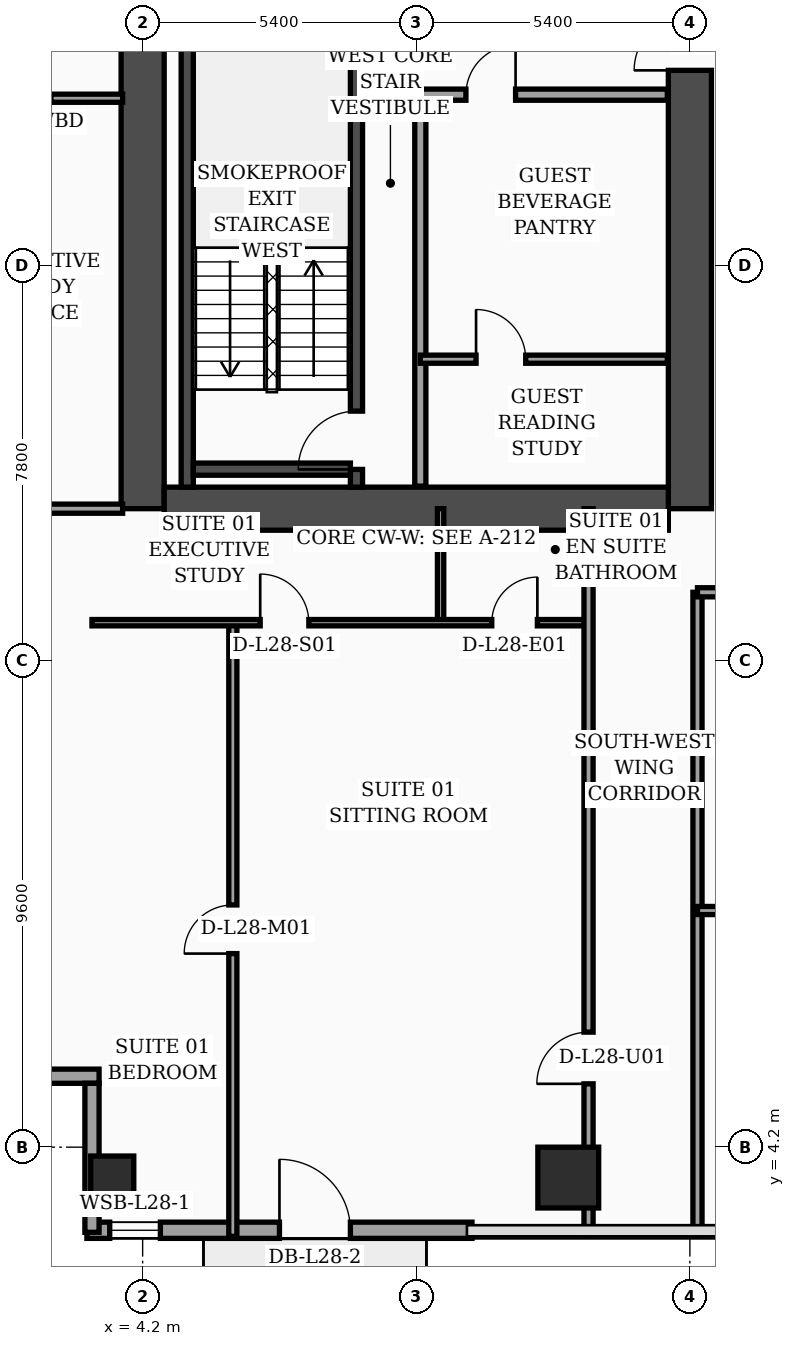
"""IFC4 building model, lengths in metres.
Left out: names, types, materials, properties, quantities, classifications, styles, units other than length and angle.
Written with IfcOpenShell. Run it as: python <this file> out.ifc"""

import sys

from ifc_helpers import new_model, si_unit, direction, frame, frame_2d, origin, origin_2d, place, context, subcontext, project, spatial, rectangle, hollow_rectangle, extrude, element, fill, save


model = new_model("IFC4")
c1 = context("Model", 3, precision=1e-05, world=origin(), true_north=direction((0.0, 1.0)))
c2 = subcontext(c1, "Body", "Model", "MODEL_VIEW")
j1 = project(units=[si_unit("LENGTHUNIT", "METRE"), si_unit("PLANEANGLEUNIT", "RADIAN")], contexts=[c1])
p1 = place(None, origin())
s1 = spatial("IfcSite", under=j1, at=p1, CompositionType="ELEMENT")
p2 = place(p1, origin())
s2 = spatial("IfcBuilding", under=s1, at=p2, CompositionType="ELEMENT")
p3 = place(p2, frame((0.0, 0.0, 116.4)))
s3 = spatial("IfcBuildingStorey", under=s2, at=p3, CompositionType="ELEMENT", Elevation=116.4)
p4 = place(p3, frame((4.2, 16.8, 0.0), z_axis=(0.0, 0.0, 1.0), x_axis=(0.0, 1.0, 0.0)))
e1 = element("IfcWall", 1, at=p4, inside=s3, PredefinedType="SHEAR", context=c2, shape_type="SweptSolid", body=[
    extrude(rectangle(XDim=21.6, YDim=0.85, at=frame_2d((10.8, 0.0))), origin(), (0.0, 0.0, 1.0), 3.56),
])
p5 = place(p3, frame((15.0, 16.8, 0.0), z_axis=(0.0, 0.0, 1.0), x_axis=(0.0, 1.0, 0.0)))
e2 = element("IfcWall", 2, at=p5, inside=s3, PredefinedType="SHEAR", context=c2, shape_type="SweptSolid", body=[
    extrude(rectangle(XDim=21.6, YDim=0.85, at=frame_2d((10.8, 0.0))), origin(), (0.0, 0.0, 1.0), 3.56),
])
p6 = place(p5, frame((8.65, 0.0, 0.0)))
e3 = element("IfcOpeningElement", 3, at=p6, cuts=e2, PredefinedType="OPENING", context=c2, shape_type="SweptSolid", body=[
    extrude(rectangle(XDim=1.1, YDim=2.2, at=frame_2d((0.55, 1.1))), frame((0.0, 0.435, 0.0), z_axis=(0.0, -1.0, 0.0), x_axis=(1.0, 0.0, 0.0)), (0.0, 0.0, 1.0), 0.87),
])
p7 = place(p5, frame((10.85, 0.0, 0.0)))
e4 = element("IfcOpeningElement", 4, at=p7, cuts=e2, PredefinedType="OPENING", context=c2, shape_type="SweptSolid", body=[
    extrude(rectangle(XDim=1.1, YDim=2.2, at=frame_2d((0.55, 1.1))), frame((0.0, 0.435, 0.0), z_axis=(0.0, -1.0, 0.0), x_axis=(1.0, 0.0, 0.0)), (0.0, 0.0, 1.0), 0.87),
])
p8 = place(p5, frame((13.5, 0.0, 0.0)))
e5 = element("IfcOpeningElement", 5, at=p8, cuts=e2, PredefinedType="OPENING", context=c2, shape_type="SweptSolid", body=[
    extrude(rectangle(XDim=1.1, YDim=2.2, at=frame_2d((0.55, 1.1))), frame((0.0, 0.435, 0.0), z_axis=(0.0, -1.0, 0.0), x_axis=(1.0, 0.0, 0.0)), (0.0, 0.0, 1.0), 0.87),
])
p9 = place(p5, frame((16.15, 0.0, 0.0)))
e6 = element("IfcOpeningElement", 6, at=p9, cuts=e2, PredefinedType="OPENING", context=c2, shape_type="SweptSolid", body=[
    extrude(rectangle(XDim=1.1, YDim=2.2, at=frame_2d((0.55, 1.1))), frame((0.0, 0.435, 0.0), z_axis=(0.0, -1.0, 0.0), x_axis=(1.0, 0.0, 0.0)), (0.0, 0.0, 1.0), 0.87),
])
p10 = place(p3, frame((4.625, 16.8, 0.0), z_axis=(0.0, 0.0, 1.0), x_axis=(1.0, 0.0, 0.0)))
e7 = element("IfcWall", 7, at=p10, inside=s3, PredefinedType="SHEAR", context=c2, shape_type="SweptSolid", body=[
    extrude(rectangle(XDim=9.95, YDim=0.85, at=frame_2d((4.975, 0.0))), origin(), (0.0, 0.0, 1.0), 3.56),
])
p11 = place(p3, frame((5.08, 17.225, 0.0), z_axis=(0.0, 0.0, 1.0), x_axis=(0.0, 1.0, 0.0)))
e8 = element("IfcWall", 8, at=p11, inside=s3, PredefinedType="SOLIDWALL", context=c2, shape_type="SweptSolid", body=[
    extrude(rectangle(XDim=9.565, YDim=0.24, at=frame_2d((4.782, 0.0))), origin(), (0.0, 0.0, 1.0), 3.56),
])
p12 = place(p3, frame((8.42, 17.225, 0.0), z_axis=(0.0, 0.0, 1.0), x_axis=(0.0, 1.0, 0.0)))
e9 = element("IfcWall", 9, at=p12, inside=s3, PredefinedType="SOLIDWALL", context=c2, shape_type="SweptSolid", body=[
    extrude(rectangle(XDim=9.565, YDim=0.24, at=frame_2d((4.782, 0.0))), origin(), (0.0, 0.0, 1.0), 3.56),
])
p13 = place(p12, frame((0.35, 0.0, 0.0)))
e10 = element("IfcOpeningElement", 10, at=p13, cuts=e9, PredefinedType="OPENING", context=c2, shape_type="SweptSolid", body=[
    extrude(rectangle(XDim=1.15, YDim=2.2, at=frame_2d((0.575, 1.1))), frame((0.0, 0.13, 0.0), z_axis=(0.0, -1.0, 0.0), x_axis=(1.0, 0.0, 0.0)), (0.0, 0.0, 1.0), 0.26),
])
p14 = place(p3, frame((5.2, 17.58, 0.0), z_axis=(0.0, 0.0, 1.0), x_axis=(1.0, 0.0, 0.0)))
e11 = element("IfcWall", 11, at=p14, inside=s3, PredefinedType="SOLIDWALL", context=c2, shape_type="SweptSolid", body=[
    extrude(rectangle(XDim=3.1, YDim=0.24, at=frame_2d((1.55, 0.0))), origin(), (0.0, 0.0, 1.0), 3.56),
])
p15 = place(p3, frame((3.6, 3.6, 0.0), z_axis=(0.0, 0.0, 1.0), x_axis=(1.0, 0.0, 0.0)))
e12 = element("IfcColumn", 12, at=p15, inside=s3, PredefinedType="COLUMN", context=c2, shape_type="SweptSolid", body=[
    extrude(hollow_rectangle(XDim=0.85, YDim=0.85, WallThickness=0.036, at=origin_2d()), origin(), (0.0, 0.0, 1.0), 3.56),
])
p16 = place(p3, frame((12.6, 3.6, 0.0), z_axis=(0.0, 0.0, 1.0), x_axis=(1.0, 0.0, 0.0)))
e13 = element("IfcColumn", 13, at=p16, inside=s3, PredefinedType="COLUMN", context=c2, shape_type="SweptSolid", body=[
    extrude(rectangle(XDim=1.2, YDim=1.2, at=origin_2d()), origin(), (0.0, 0.0, 1.0), 3.56),
])
p17 = place(p3, frame((3.1, 2.56, 0.0), z_axis=(0.0, 0.0, 1.0), x_axis=(1.0, 0.0, 0.0)))
e14 = element("IfcWall", 14, at=p17, inside=s3, PredefinedType="SOLIDWALL", context=c2, shape_type="SweptSolid", body=[
    extrude(rectangle(XDim=7.6, YDim=0.32, at=frame_2d((3.8, 0.0))), origin(), (0.0, 0.0, 1.0), 3.56),
])
p18 = place(p17, frame((0.45, 0.0, 0.75)))
e15 = element("IfcOpeningElement", 15, at=p18, cuts=e14, PredefinedType="OPENING", context=c2, shape_type="SweptSolid", body=[
    extrude(rectangle(XDim=1.0, YDim=1.6, at=frame_2d((0.5, 0.8))), frame((0.0, 0.17, 0.0), z_axis=(0.0, -1.0, 0.0), x_axis=(1.0, 0.0, 0.0)), (0.0, 0.0, 1.0), 0.34),
])
p19 = place(p17, frame((3.8, 0.0, 0.0)))
e16 = element("IfcOpeningElement", 16, at=p19, cuts=e14, PredefinedType="OPENING", context=c2, shape_type="SweptSolid", body=[
    extrude(rectangle(XDim=1.4, YDim=2.25, at=frame_2d((0.7, 1.125))), frame((0.0, 0.17, 0.0), z_axis=(0.0, -1.0, 0.0), x_axis=(1.0, 0.0, 0.0)), (0.0, 0.0, 1.0), 0.34),
])
p20 = place(p3, frame((0.12, 5.6, 0.0), z_axis=(0.0, 0.0, 1.0), x_axis=(1.0, 0.0, 0.0)))
e17 = element("IfcWall", 17, at=p20, inside=s3, PredefinedType="SOLIDWALL", context=c2, shape_type="SweptSolid", body=[
    extrude(rectangle(XDim=3.22, YDim=0.28, at=frame_2d((1.61, 0.0))), origin(), (0.0, 0.0, 1.0), 2.84),
])
p21 = place(p3, frame((3.2, 5.46, 0.0), z_axis=(0.0, 0.0, 1.0), x_axis=(0.0, -1.0, 0.0)))
e18 = element("IfcWall", 18, at=p21, inside=s3, PredefinedType="SOLIDWALL", context=c2, shape_type="SweptSolid", body=[
    extrude(rectangle(XDim=2.94, YDim=0.28, at=frame_2d((1.47, 0.0))), origin(), (0.0, 0.0, 1.0), 2.84),
])
p22 = place(p3, frame((9.68, 17.245, 0.0), z_axis=(0.0, 0.0, 1.0), x_axis=(0.0, 1.0, 0.0)))
e19 = element("IfcWall", 19, at=p22, inside=s3, PredefinedType="SOLIDWALL", context=c2, shape_type="SweptSolid", body=[
    extrude(rectangle(XDim=7.755, YDim=0.22, at=frame_2d((3.877, 0.0))), origin(), (0.0, 0.0, 1.0), 3.56),
])
p23 = place(p3, frame((9.68, 19.75, 0.0), z_axis=(0.0, 0.0, 1.0), x_axis=(1.0, 0.0, 0.0)))
e20 = element("IfcWall", 20, at=p23, inside=s3, PredefinedType="PARTITIONING", context=c2, shape_type="SweptSolid", body=[
    extrude(rectangle(XDim=4.875, YDim=0.16, at=frame_2d((2.438, 0.0))), origin(), (0.0, 0.0, 1.0), 3.56),
])
p24 = place(p23, frame((1.1, 0.0, 0.0)))
e21 = element("IfcOpeningElement", 21, at=p24, cuts=e20, PredefinedType="OPENING", context=c2, shape_type="SweptSolid", body=[
    extrude(rectangle(XDim=0.98, YDim=2.15, at=frame_2d((0.49, 1.075))), frame((0.0, 0.09, 0.0), z_axis=(0.0, -1.0, 0.0), x_axis=(1.0, 0.0, 0.0)), (0.0, 0.0, 1.0), 0.18),
])
p25 = place(p3, frame((9.68, 24.97, 0.0), z_axis=(0.0, 0.0, 1.0), x_axis=(1.0, 0.0, 0.0)))
e22 = element("IfcWall", 22, at=p25, inside=s3, PredefinedType="SOLIDWALL", context=c2, shape_type="SweptSolid", body=[
    extrude(rectangle(XDim=4.875, YDim=0.22, at=frame_2d((2.438, 0.0))), origin(), (0.0, 0.0, 1.0), 2.84),
])
p26 = place(p25, frame((0.9, 0.0, 0.0)))
e23 = element("IfcOpeningElement", 23, at=p26, cuts=e22, PredefinedType="OPENING", context=c2, shape_type="SweptSolid", body=[
    extrude(rectangle(XDim=0.98, YDim=2.15, at=frame_2d((0.49, 1.075))), frame((0.0, 0.12, 0.0), z_axis=(0.0, -1.0, 0.0), x_axis=(1.0, 0.0, 0.0)), (0.0, 0.0, 1.0), 0.24),
])
p27 = place(p3, frame((0.08, 24.9, 0.0), z_axis=(0.0, 0.0, 1.0), x_axis=(1.0, 0.0, 0.0)))
e24 = element("IfcWall", 24, at=p27, inside=s3, PredefinedType="PARTITIONING", context=c2, shape_type="SweptSolid", body=[
    extrude(rectangle(XDim=3.725, YDim=0.16, at=frame_2d((1.862, 0.0))), origin(), (0.0, 0.0, 1.0), 3.04),
])
p28 = place(p27, frame((1.35, 0.0, 0.0)))
e25 = element("IfcOpeningElement", 25, at=p28, cuts=e24, PredefinedType="OPENING", context=c2, shape_type="SweptSolid", body=[
    extrude(rectangle(XDim=0.96, YDim=2.2, at=frame_2d((0.48, 1.1))), frame((0.0, 0.09, 0.0), z_axis=(0.0, -1.0, 0.0), x_axis=(1.0, 0.0, 0.0)), (0.0, 0.0, 1.0), 0.18),
])
p29 = place(p3, frame((0.08, 16.8, 0.0), z_axis=(0.0, 0.0, 1.0), x_axis=(1.0, 0.0, 0.0)))
e26 = element("IfcWall", 26, at=p29, inside=s3, PredefinedType="PARTITIONING", context=c2, shape_type="SweptSolid", body=[
    extrude(rectangle(XDim=3.725, YDim=0.18, at=frame_2d((1.862, 0.0))), origin(), (0.0, 0.0, 1.0), 2.84),
])
p30 = place(p3, frame((10.08, 14.55, 0.0), z_axis=(0.0, 0.0, 1.0), x_axis=(0.0, 1.0, 0.0)))
e27 = element("IfcWall", 27, at=p30, inside=s3, PredefinedType="PARTITIONING", context=c2, shape_type="SweptSolid", body=[
    extrude(rectangle(XDim=2.25, YDim=0.125, at=frame_2d((1.125, 0.0))), origin(), (0.0, 0.0, 1.0), 3.56),
])
p31 = place(p3, frame((5.98, 2.44, 0.0), z_axis=(0.0, 0.0, 1.0), x_axis=(0.0, 1.0, 0.0)))
e28 = element("IfcWall", 28, at=p31, inside=s3, PredefinedType="PARTITIONING", context=c2, shape_type="SweptSolid", body=[
    extrude(rectangle(XDim=12.11, YDim=0.16, at=frame_2d((6.055, 0.0))), origin(), (0.0, 0.0, 1.0), 3.04),
])
p32 = place(p31, frame((5.58, 0.0, 0.0)))
e29 = element("IfcOpeningElement", 29, at=p32, cuts=e28, PredefinedType="OPENING", context=c2, shape_type="SweptSolid", body=[
    extrude(rectangle(XDim=0.96, YDim=2.2, at=frame_2d((0.48, 1.1))), frame((0.0, 0.09, 0.0), z_axis=(0.0, -1.0, 0.0), x_axis=(1.0, 0.0, 0.0)), (0.0, 0.0, 1.0), 0.18),
])
p33 = place(p3, frame((3.2, 14.55, 0.0), z_axis=(0.0, 0.0, 1.0), x_axis=(1.0, 0.0, 0.0)))
e30 = element("IfcWall", 30, at=p33, inside=s3, PredefinedType="PARTITIONING", context=c2, shape_type="SweptSolid", body=[
    extrude(rectangle(XDim=9.8, YDim=0.125, at=frame_2d((4.9, 0.0))), origin(), (0.0, 0.0, 1.0), 2.84),
])
p34 = place(p33, frame((3.32, 0.0, 0.0)))
e31 = element("IfcOpeningElement", 31, at=p34, cuts=e30, PredefinedType="OPENING", context=c2, shape_type="SweptSolid", body=[
    extrude(rectangle(XDim=0.96, YDim=2.2, at=frame_2d((0.48, 1.1))), frame((0.0, 0.073, 0.0), z_axis=(0.0, -1.0, 0.0), x_axis=(1.0, 0.0, 0.0)), (0.0, 0.0, 1.0), 0.145),
])
p35 = place(p33, frame((7.89, 0.0, 0.0)))
e32 = element("IfcOpeningElement", 32, at=p35, cuts=e30, PredefinedType="OPENING", context=c2, shape_type="SweptSolid", body=[
    extrude(rectangle(XDim=0.9, YDim=2.15, at=frame_2d((0.45, 1.075))), frame((0.0, 0.073, 0.0), z_axis=(0.0, -1.0, 0.0), x_axis=(1.0, 0.0, 0.0)), (0.0, 0.0, 1.0), 0.145),
])
p36 = place(p3, frame((13.0, 2.44, 0.0), z_axis=(0.0, 0.0, 1.0), x_axis=(0.0, 1.0, 0.0)))
e33 = element("IfcWall", 33, at=p36, inside=s3, PredefinedType="PARTITIONING", context=c2, shape_type="SweptSolid", body=[
    extrude(rectangle(XDim=14.36, YDim=0.18, at=frame_2d((7.18, 0.0))), origin(), (0.0, 0.0, 1.0), 2.84),
])
p37 = place(p36, frame((3.01, 0.0, 0.0)))
e34 = element("IfcOpeningElement", 34, at=p37, cuts=e33, PredefinedType="OPENING", context=c2, shape_type="SweptSolid", body=[
    extrude(rectangle(XDim=1.02, YDim=2.2, at=frame_2d((0.51, 1.1))), frame((0.0, 0.1, 0.0), z_axis=(0.0, -1.0, 0.0), x_axis=(1.0, 0.0, 0.0)), (0.0, 0.0, 1.0), 0.2),
])
p38 = place(p3, frame((15.15, 2.44, 0.0), z_axis=(0.0, 0.0, 1.0), x_axis=(0.0, 1.0, 0.0)))
e35 = element("IfcWall", 35, at=p38, inside=s3, PredefinedType="PARTITIONING", context=c2, shape_type="SweptSolid", body=[
    extrude(rectangle(XDim=12.71, YDim=0.18, at=frame_2d((6.355, 0.0))), origin(), (0.0, 0.0, 1.0), 3.04),
])
p39 = place(p3, frame((15.15, 8.87, 0.0), z_axis=(0.0, 0.0, 1.0), x_axis=(1.0, 0.0, 0.0)))
e36 = element("IfcWall", 36, at=p39, inside=s3, PredefinedType="PARTITIONING", context=c2, shape_type="SweptSolid", body=[
    extrude(rectangle(XDim=4.45, YDim=0.16, at=frame_2d((2.225, 0.0))), origin(), (0.0, 0.0, 1.0), 3.56),
])
p40 = place(p39, frame((1.75, 0.0, 0.0)))
e37 = element("IfcOpeningElement", 37, at=p40, cuts=e36, PredefinedType="OPENING", context=c2, shape_type="SweptSolid", body=[
    extrude(rectangle(XDim=0.96, YDim=2.2, at=frame_2d((0.48, 1.1))), frame((0.0, 0.09, 0.0), z_axis=(0.0, -1.0, 0.0), x_axis=(1.0, 0.0, 0.0)), (0.0, 0.0, 1.0), 0.18),
])
p41 = place(p3, frame((15.15, 15.15, 0.0), z_axis=(0.0, 0.0, 1.0), x_axis=(1.0, 0.0, 0.0)))
e38 = element("IfcWall", 38, at=p41, inside=s3, PredefinedType="PARTITIONING", context=c2, shape_type="SweptSolid", body=[
    extrude(rectangle(XDim=6.45, YDim=0.18, at=frame_2d((3.225, 0.0))), origin(), (0.0, 0.0, 1.0), 2.49),
])
p42 = place(p41, frame((1.74, 0.0, 0.0)))
e39 = element("IfcOpeningElement", 39, at=p42, cuts=e38, PredefinedType="OPENING", context=c2, shape_type="SweptSolid", body=[
    extrude(rectangle(XDim=1.02, YDim=2.2, at=frame_2d((0.51, 1.1))), frame((0.0, 0.1, 0.0), z_axis=(0.0, -1.0, 0.0), x_axis=(1.0, 0.0, 0.0)), (0.0, 0.0, 1.0), 0.2),
])
p43 = place(p18, origin())
e40 = element("IfcWindow", 40, at=p43, inside=s3, PartitioningType="SINGLE_PANEL", PredefinedType="WINDOW", context=c2, shape_type="SweptSolid", body=[
    extrude(rectangle(XDim=1.0, YDim=1.6, at=frame_2d((0.5, 0.8))), frame((0.0, 0.03, 0.0), z_axis=(0.0, -1.0, 0.0), x_axis=(1.0, 0.0, 0.0)), (0.0, 0.0, 1.0), 0.06),
])
fill(e15, e40)
p44 = place(p19, origin())
e41 = element("IfcDoor", 41, at=p44, inside=s3, OperationType="SINGLE_SWING_LEFT", PredefinedType="DOOR", context=c2, shape_type="SweptSolid", body=[
    extrude(rectangle(XDim=1.4, YDim=2.25, at=frame_2d((0.7, 1.125))), frame((0.0, 0.025, 0.0), z_axis=(0.0, -1.0, 0.0), x_axis=(1.0, 0.0, 0.0)), (0.0, 0.0, 1.0), 0.05),
])
fill(e16, e41)
p45 = place(p24, origin())
e42 = element("IfcDoor", 42, at=p45, inside=s3, OperationType="SINGLE_SWING_LEFT", PredefinedType="DOOR", context=c2, shape_type="SweptSolid", body=[
    extrude(rectangle(XDim=0.98, YDim=2.15, at=frame_2d((0.49, 1.075))), frame((0.0, 0.025, 0.0), z_axis=(0.0, -1.0, 0.0), x_axis=(1.0, 0.0, 0.0)), (0.0, 0.0, 1.0), 0.05),
])
fill(e21, e42)
p46 = place(p26, origin())
e43 = element("IfcDoor", 43, at=p46, inside=s3, OperationType="SINGLE_SWING_RIGHT", PredefinedType="DOOR", context=c2, shape_type="SweptSolid", body=[
    extrude(rectangle(XDim=0.98, YDim=2.15, at=frame_2d((0.49, 1.075))), frame((0.0, 0.025, 0.0), z_axis=(0.0, -1.0, 0.0), x_axis=(1.0, 0.0, 0.0)), (0.0, 0.0, 1.0), 0.05),
])
fill(e23, e43)
p47 = place(p32, origin())
e44 = element("IfcDoor", 44, at=p47, inside=s3, OperationType="SINGLE_SWING_LEFT", PredefinedType="DOOR", context=c2, shape_type="SweptSolid", body=[
    extrude(rectangle(XDim=0.96, YDim=2.2, at=frame_2d((0.48, 1.1))), frame((0.0, 0.025, 0.0), z_axis=(0.0, -1.0, 0.0), x_axis=(1.0, 0.0, 0.0)), (0.0, 0.0, 1.0), 0.05),
])
fill(e29, e44)
p48 = place(p34, origin())
e45 = element("IfcDoor", 45, at=p48, inside=s3, OperationType="SINGLE_SWING_LEFT", PredefinedType="DOOR", context=c2, shape_type="SweptSolid", body=[
    extrude(rectangle(XDim=0.96, YDim=2.2, at=frame_2d((0.48, 1.1))), frame((0.0, 0.025, 0.0), z_axis=(0.0, -1.0, 0.0), x_axis=(1.0, 0.0, 0.0)), (0.0, 0.0, 1.0), 0.05),
])
fill(e31, e45)
p49 = place(p35, origin())
e46 = element("IfcDoor", 46, at=p49, inside=s3, OperationType="SINGLE_SWING_RIGHT", PredefinedType="DOOR", context=c2, shape_type="SweptSolid", body=[
    extrude(rectangle(XDim=0.9, YDim=2.15, at=frame_2d((0.45, 1.075))), frame((0.0, 0.025, 0.0), z_axis=(0.0, -1.0, 0.0), x_axis=(1.0, 0.0, 0.0)), (0.0, 0.0, 1.0), 0.05),
])
fill(e32, e46)
p50 = place(p37, origin())
e47 = element("IfcDoor", 47, at=p50, inside=s3, OperationType="SINGLE_SWING_LEFT", PredefinedType="DOOR", context=c2, shape_type="SweptSolid", body=[
    extrude(rectangle(XDim=1.02, YDim=2.2, at=frame_2d((0.51, 1.1))), frame((0.0, 0.025, 0.0), z_axis=(0.0, -1.0, 0.0), x_axis=(1.0, 0.0, 0.0)), (0.0, 0.0, 1.0), 0.05),
])
fill(e34, e47)
p51 = place(p13, origin())
e48 = element("IfcDoor", 48, at=p51, inside=s3, OperationType="SINGLE_SWING_LEFT", PredefinedType="DOOR", context=c2, shape_type="SweptSolid", body=[
    extrude(rectangle(XDim=1.15, YDim=2.2, at=frame_2d((0.575, 1.1))), frame((0.0, 0.025, 0.0), z_axis=(0.0, -1.0, 0.0), x_axis=(1.0, 0.0, 0.0)), (0.0, 0.0, 1.0), 0.05),
])
fill(e10, e48)
p52 = place(p6, origin())
e49 = element("IfcDoor", 49, at=p52, inside=s3, OperationType="SINGLE_SWING_LEFT", PredefinedType="DOOR", context=c2, shape_type="SweptSolid", body=[
    extrude(rectangle(XDim=1.1, YDim=2.2, at=frame_2d((0.55, 1.1))), frame((0.0, 0.025, 0.0), z_axis=(0.0, -1.0, 0.0), x_axis=(1.0, 0.0, 0.0)), (0.0, 0.0, 1.0), 0.05),
])
fill(e3, e49)
save(model, sys.argv[1])
